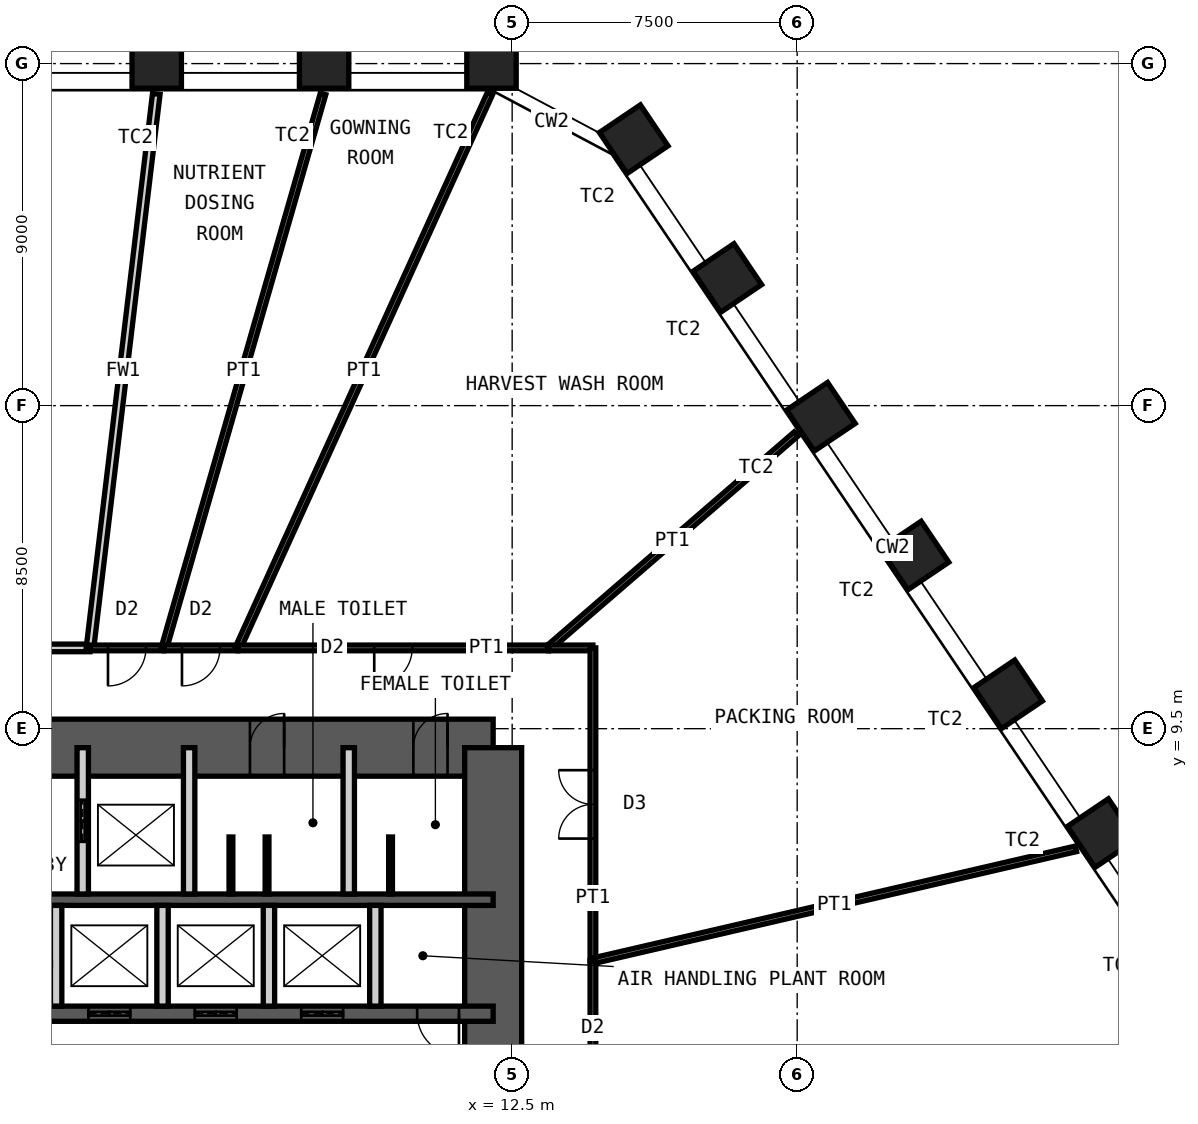
"""IFC4 building model, lengths in metres.
Left out: names, types, materials, properties, quantities, classifications, styles, units other than length and angle.
Written with IfcOpenShell. Run it as: python <this file> out.ifc"""

import sys

from ifc_helpers import new_model, si_unit, direction, frame, frame_2d, origin, origin_2d, place, context, subcontext, project, spatial, rectangle, hollow_rectangle, extrude, element, fill, save


model = new_model("IFC4")
c1 = context("Model", 3, precision=1e-05, world=origin(), true_north=direction((0.0, 1.0)))
c2 = subcontext(c1, "Body", "Model", "MODEL_VIEW")
j1 = project(units=[si_unit("LENGTHUNIT", "METRE"), si_unit("PLANEANGLEUNIT", "RADIAN")], contexts=[c1])
p1 = place(None, origin())
s1 = spatial("IfcSite", under=j1, at=p1, CompositionType="ELEMENT")
p2 = place(p1, origin())
s2 = spatial("IfcBuilding", under=s1, at=p2, CompositionType="ELEMENT")
p3 = place(p2, frame((0.0, 0.0, 77.0)))
s3 = spatial("IfcBuildingStorey", under=s2, at=p3, CompositionType="ELEMENT", Elevation=77.0)
for number, where, z_axis, x_axis in (
    (1, (3.147, 27.0, 0.0), (0.0, 0.0, 1.0), (-1.0, 0.0, 0.0)),
    (2, (7.552, 27.0, 0.0), (0.0, 0.0, 1.0), (-1.0, 0.0, 0.0)),
    (3, (11.956, 27.0, 0.0), (0.0, 0.0, 1.0), (-1.0, 0.0, 0.0)),
    (4, (15.698, 25.01, 0.0), (0.0, 0.0, 1.0), (-0.559, 0.829, 0.0)),
    (5, (18.161, 21.359, 0.0), (0.0, 0.0, 1.0), (-0.559, 0.829, 0.0)),
    (6, (20.624, 17.707, 0.0), (0.0, 0.0, 1.0), (-0.559, 0.829, 0.0)),
    (7, (23.087, 14.056, 0.0), (0.0, 0.0, 1.0), (-0.559, 0.829, 0.0)),
    (8, (25.55, 10.404, 0.0), (0.0, 0.0, 1.0), (-0.559, 0.829, 0.0)),
    (9, (28.013, 6.752, 0.0), (0.0, 0.0, 1.0), (-0.559, 0.829, 0.0)),
):
    element("IfcColumn", number, at=place(p3, frame(where, z_axis=z_axis, x_axis=x_axis)), inside=s3, PredefinedType="COLUMN", context=c2, shape_type="SweptSolid", body=[
        extrude(hollow_rectangle(XDim=1.3, YDim=1.3, WallThickness=0.1, at=origin_2d()), origin(), (0.0, 0.0, 1.0), 5.0),
    ])
p4 = place(p3, frame((-12.0, 9.0, 0.0), z_axis=(0.0, 0.0, 1.0), x_axis=(1.0, 0.0, 0.0)))
e10 = element("IfcWall", 10, at=p4, inside=s3, PredefinedType="SHEAR", context=c2, shape_type="SweptSolid", body=[
    extrude(rectangle(XDim=24.0, YDim=1.5, at=frame_2d((12.0, 0.0))), origin(), (0.0, 0.0, 1.0), 5.0),
])
p5 = place(p4, frame((10.4, 0.0, 0.0)))
e11 = element("IfcOpeningElement", 11, at=p5, cuts=e10, PredefinedType="OPENING", context=c2, shape_type="SweptSolid", body=[
    extrude(rectangle(XDim=1.0, YDim=2.1, at=frame_2d((0.5, 1.05))), frame((0.0, 0.76, 0.0), z_axis=(0.0, -1.0, 0.0), x_axis=(1.0, 0.0, 0.0)), (0.0, 0.0, 1.0), 1.52),
])
p6 = place(p4, frame((17.6, 0.0, 0.0)))
e12 = element("IfcOpeningElement", 12, at=p6, cuts=e10, PredefinedType="OPENING", context=c2, shape_type="SweptSolid", body=[
    extrude(rectangle(XDim=0.9, YDim=2.1, at=frame_2d((0.45, 1.05))), frame((0.0, 0.76, 0.0), z_axis=(0.0, -1.0, 0.0), x_axis=(1.0, 0.0, 0.0)), (0.0, 0.0, 1.0), 1.52),
])
p7 = place(p4, frame((21.9, 0.0, 0.0)))
e13 = element("IfcOpeningElement", 13, at=p7, cuts=e10, PredefinedType="OPENING", context=c2, shape_type="SweptSolid", body=[
    extrude(rectangle(XDim=0.9, YDim=2.1, at=frame_2d((0.45, 1.05))), frame((0.0, 0.76, 0.0), z_axis=(0.0, -1.0, 0.0), x_axis=(1.0, 0.0, 0.0)), (0.0, 0.0, 1.0), 1.52),
])
p8 = place(p3, frame((12.0, -9.0, 0.0), z_axis=(0.0, 0.0, 1.0), x_axis=(0.0, 1.0, 0.0)))
e14 = element("IfcWall", 14, at=p8, inside=s3, PredefinedType="SHEAR", context=c2, shape_type="SweptSolid", body=[
    extrude(rectangle(XDim=18.0, YDim=1.5, at=frame_2d((9.0, 0.0))), origin(), (0.0, 0.0, 1.0), 5.0),
])
p9 = place(p8, frame((8.1, 0.0, 0.0)))
e15 = element("IfcOpeningElement", 15, at=p9, cuts=e14, PredefinedType="OPENING", context=c2, shape_type="SweptSolid", body=[
    extrude(rectangle(XDim=1.8, YDim=2.1, at=frame_2d((0.9, 1.05))), frame((0.0, 0.76, 0.0), z_axis=(0.0, -1.0, 0.0), x_axis=(1.0, 0.0, 0.0)), (0.0, 0.0, 1.0), 1.52),
])
p10 = place(p3, frame((-12.0, 5.0, 0.0), z_axis=(0.0, 0.0, 1.0), x_axis=(1.0, 0.0, 0.0)))
e16 = element("IfcWall", 16, at=p10, inside=s3, PredefinedType="SHEAR", context=c2, shape_type="SweptSolid", body=[
    extrude(rectangle(XDim=24.0, YDim=0.3, at=frame_2d((12.0, 0.0))), origin(), (0.0, 0.0, 1.0), 5.0),
])
p11 = place(p3, frame((-12.0, 2.0, 0.0), z_axis=(0.0, 0.0, 1.0), x_axis=(1.0, 0.0, 0.0)))
e17 = element("IfcWall", 17, at=p11, inside=s3, PredefinedType="SHEAR", context=c2, shape_type="SweptSolid", body=[
    extrude(rectangle(XDim=24.0, YDim=0.4, at=frame_2d((12.0, 0.0))), origin(), (0.0, 0.0, 1.0), 5.0),
])
p12 = place(p11, frame((2.4, 0.0, 0.0)))
e18 = element("IfcOpeningElement", 18, at=p12, cuts=e17, PredefinedType="OPENING", context=c2, shape_type="SweptSolid", body=[
    extrude(rectangle(XDim=1.1, YDim=2.1, at=frame_2d((0.55, 1.05))), frame((0.0, 0.21, 0.0), z_axis=(0.0, -1.0, 0.0), x_axis=(1.0, 0.0, 0.0)), (0.0, 0.0, 1.0), 0.42),
])
p13 = place(p11, frame((22.0, 0.0, 0.0)))
e19 = element("IfcOpeningElement", 19, at=p13, cuts=e17, PredefinedType="OPENING", context=c2, shape_type="SweptSolid", body=[
    extrude(rectangle(XDim=1.1, YDim=2.1, at=frame_2d((0.55, 1.05))), frame((0.0, 0.21, 0.0), z_axis=(0.0, -1.0, 0.0), x_axis=(1.0, 0.0, 0.0)), (0.0, 0.0, 1.0), 0.42),
])
p14 = place(p11, frame((10.15, 0.0, 0.0)))
e20 = element("IfcOpeningElement", 20, at=p14, cuts=e17, PredefinedType="OPENING", context=c2, shape_type="SweptSolid", body=[
    extrude(rectangle(XDim=1.0, YDim=2.1, at=frame_2d((0.5, 1.05))), frame((0.0, 0.21, 0.0), z_axis=(0.0, -1.0, 0.0), x_axis=(1.0, 0.0, 0.0)), (0.0, 0.0, 1.0), 0.42),
])
p15 = place(p11, frame((6.7, 0.0, 0.0)))
e21 = element("IfcOpeningElement", 21, at=p15, cuts=e17, PredefinedType="OPENING", context=c2, shape_type="SweptSolid", body=[
    extrude(rectangle(XDim=1.4, YDim=2.4, at=frame_2d((0.7, 1.2))), frame((0.0, 0.21, 0.0), z_axis=(0.0, -1.0, 0.0), x_axis=(1.0, 0.0, 0.0)), (0.0, 0.0, 1.0), 0.42),
])
p16 = place(p11, frame((13.35, 0.0, 0.0)))
e22 = element("IfcOpeningElement", 22, at=p16, cuts=e17, PredefinedType="OPENING", context=c2, shape_type="SweptSolid", body=[
    extrude(rectangle(XDim=1.1, YDim=2.4, at=frame_2d((0.55, 1.2))), frame((0.0, 0.21, 0.0), z_axis=(0.0, -1.0, 0.0), x_axis=(1.0, 0.0, 0.0)), (0.0, 0.0, 1.0), 0.42),
])
p17 = place(p11, frame((16.15, 0.0, 0.0)))
e23 = element("IfcOpeningElement", 23, at=p17, cuts=e17, PredefinedType="OPENING", context=c2, shape_type="SweptSolid", body=[
    extrude(rectangle(XDim=1.1, YDim=2.4, at=frame_2d((0.55, 1.2))), frame((0.0, 0.21, 0.0), z_axis=(0.0, -1.0, 0.0), x_axis=(1.0, 0.0, 0.0)), (0.0, 0.0, 1.0), 0.42),
])
p18 = place(p11, frame((18.95, 0.0, 0.0)))
e24 = element("IfcOpeningElement", 24, at=p18, cuts=e17, PredefinedType="OPENING", context=c2, shape_type="SweptSolid", body=[
    extrude(rectangle(XDim=1.1, YDim=2.4, at=frame_2d((0.55, 1.2))), frame((0.0, 0.21, 0.0), z_axis=(0.0, -1.0, 0.0), x_axis=(1.0, 0.0, 0.0)), (0.0, 0.0, 1.0), 0.42),
])
p19 = place(p3, frame((1.2, 5.15, 0.0), z_axis=(0.0, 0.0, 1.0), x_axis=(0.0, 1.0, 0.0)))
e25 = element("IfcWall", 25, at=p19, inside=s3, PredefinedType="PARTITIONING", context=c2, shape_type="SweptSolid", body=[
    extrude(rectangle(XDim=3.85, YDim=0.3, at=frame_2d((1.925, 0.0))), origin(), (0.0, 0.0, 1.0), 4.78),
])
p20 = place(p19, frame((1.375, 0.0, 0.0)))
e26 = element("IfcOpeningElement", 26, at=p20, cuts=e25, PredefinedType="OPENING", context=c2, shape_type="SweptSolid", body=[
    extrude(rectangle(XDim=1.1, YDim=2.4, at=frame_2d((0.55, 1.2))), frame((0.0, 0.16, 0.0), z_axis=(0.0, -1.0, 0.0), x_axis=(1.0, 0.0, 0.0)), (0.0, 0.0, 1.0), 0.32),
])
for number, where, z_axis, x_axis in (
    (27, (4.0, 5.15, 0.0), (0.0, 0.0, 1.0), (0.0, 1.0, 0.0)),
    (28, (8.2, 5.15, 0.0), (0.0, 0.0, 1.0), (0.0, 1.0, 0.0)),
):
    element("IfcWall", number, at=place(p3, frame(where, z_axis=z_axis, x_axis=x_axis)), inside=s3, PredefinedType="PARTITIONING", context=c2, shape_type="SweptSolid", body=[
        extrude(rectangle(XDim=3.85, YDim=0.3, at=frame_2d((1.925, 0.0))), origin(), (0.0, 0.0, 1.0), 4.78),
    ])
for number, where, z_axis, x_axis in (
    (29, (0.5, 2.2, 0.0), (0.0, 0.0, 1.0), (0.0, 1.0, 0.0)),
    (30, (3.3, 2.2, 0.0), (0.0, 0.0, 1.0), (0.0, 1.0, 0.0)),
    (31, (6.1, 2.2, 0.0), (0.0, 0.0, 1.0), (0.0, 1.0, 0.0)),
    (32, (8.9, 2.2, 0.0), (0.0, 0.0, 1.0), (0.0, 1.0, 0.0)),
):
    element("IfcWall", number, at=place(p3, frame(where, z_axis=z_axis, x_axis=x_axis)), inside=s3, PredefinedType="PARTITIONING", context=c2, shape_type="SweptSolid", body=[
        extrude(rectangle(XDim=2.65, YDim=0.3, at=frame_2d((1.325, 0.0))), origin(), (0.0, 0.0, 1.0), 4.78),
    ])
for number, where, z_axis, x_axis in (
    (33, (5.1, 5.15, 0.0), (0.0, 0.0, 1.0), (0.0, 1.0, 0.0)),
    (34, (6.05, 5.15, 0.0), (0.0, 0.0, 1.0), (0.0, 1.0, 0.0)),
    (35, (9.3, 5.15, 0.0), (0.0, 0.0, 1.0), (0.0, 1.0, 0.0)),
):
    element("IfcWall", number, at=place(p3, frame(where, z_axis=z_axis, x_axis=x_axis)), inside=s3, PredefinedType="PARTITIONING", context=c2, shape_type="SweptSolid", body=[
        extrude(rectangle(XDim=1.5, YDim=0.1, at=frame_2d((0.75, 0.0))), origin(), (0.0, 0.0, 1.0), 2.1),
    ])
p21 = place(p3, frame((-2.503, 11.625, 0.0), z_axis=(0.0, 0.0, 1.0), x_axis=(1.0, 0.0, 0.0)))
e36 = element("IfcWall", 36, at=p21, inside=s3, PredefinedType="PARTITIONING", context=c2, shape_type="SweptSolid", body=[
    extrude(rectangle(XDim=3.894, YDim=0.2, at=frame_2d((1.947, 0.0))), origin(), (0.0, 0.0, 1.0), 4.8),
])
p22 = place(p21, frame((1.397, 0.0, 0.0)))
e37 = element("IfcOpeningElement", 37, at=p22, cuts=e36, PredefinedType="OPENING", context=c2, shape_type="SweptSolid", body=[
    extrude(rectangle(XDim=1.1, YDim=2.1, at=frame_2d((0.55, 1.05))), frame((0.0, 0.11, 0.0), z_axis=(0.0, -1.0, 0.0), x_axis=(1.0, 0.0, 0.0)), (0.0, 0.0, 1.0), 0.22),
])
p23 = place(p3, frame((3.135, 26.201, 0.0), z_axis=(0.0, 0.0, 1.0), x_axis=(-0.118796980211, -0.992918565388, 0.0)))
e38 = element("IfcWall", 38, at=p23, inside=s3, PredefinedType="PARTITIONING", context=c2, shape_type="SweptSolid", body=[
    extrude(rectangle(XDim=14.68, YDim=0.2, at=frame_2d((7.34, 0.0))), origin(), (0.0, 0.0, 1.0), 3.7),
])
p24 = place(p3, frame((1.391, 11.625, 0.0), z_axis=(0.0, 0.0, 1.0), x_axis=(1.0, 0.0, 0.0)))
e39 = element("IfcWall", 39, at=p24, inside=s3, PredefinedType="PARTITIONING", context=c2, shape_type="SweptSolid", body=[
    extrude(rectangle(XDim=1.947, YDim=0.15, at=frame_2d((0.973, 0.0))), origin(), (0.0, 0.0, 1.0), 4.8),
])
p25 = place(p24, frame((0.473, 0.0, 0.0)))
e40 = element("IfcOpeningElement", 40, at=p25, cuts=e39, PredefinedType="OPENING", context=c2, shape_type="SweptSolid", body=[
    extrude(rectangle(XDim=1.0, YDim=2.4, at=frame_2d((0.5, 1.2))), frame((0.0, 0.085, 0.0), z_axis=(0.0, -1.0, 0.0), x_axis=(1.0, 0.0, 0.0)), (0.0, 0.0, 1.0), 0.17),
])
p26 = place(p3, frame((7.524, 26.204, 0.0), z_axis=(0.0, 0.0, 1.0), x_axis=(-0.275979405656, -0.961163548858, 0.0)))
e41 = element("IfcWall", 41, at=p26, inside=s3, PredefinedType="PARTITIONING", context=c2, shape_type="SweptSolid", body=[
    extrude(rectangle(XDim=15.168, YDim=0.15, at=frame_2d((7.584, 0.0))), origin(), (0.0, 0.0, 1.0), 3.7),
])
p27 = place(p3, frame((3.338, 11.625, 0.0), z_axis=(0.0, 0.0, 1.0), x_axis=(1.0, 0.0, 0.0)))
e42 = element("IfcWall", 42, at=p27, inside=s3, PredefinedType="PARTITIONING", context=c2, shape_type="SweptSolid", body=[
    extrude(rectangle(XDim=1.947, YDim=0.15, at=frame_2d((0.974, 0.0))), origin(), (0.0, 0.0, 1.0), 4.8),
])
p28 = place(p27, frame((0.473, 0.0, 0.0)))
e43 = element("IfcOpeningElement", 43, at=p28, cuts=e42, PredefinedType="OPENING", context=c2, shape_type="SweptSolid", body=[
    extrude(rectangle(XDim=1.0, YDim=2.4, at=frame_2d((0.5, 1.2))), frame((0.0, 0.085, 0.0), z_axis=(0.0, -1.0, 0.0), x_axis=(1.0, 0.0, 0.0)), (0.0, 0.0, 1.0), 0.17),
])
p29 = place(p3, frame((11.915, 26.209, 0.0), z_axis=(0.0, 0.0, 1.0), x_axis=(-0.41384427845, -0.910347688081, 0.0)))
e44 = element("IfcWall", 44, at=p29, inside=s3, PredefinedType="PARTITIONING", context=c2, shape_type="SweptSolid", body=[
    extrude(rectangle(XDim=16.02, YDim=0.15, at=frame_2d((8.01, 0.0))), origin(), (0.0, 0.0, 1.0), 3.7),
])
p30 = place(p3, frame((5.285, 11.625, 0.0), z_axis=(0.0, 0.0, 1.0), x_axis=(1.0, 0.0, 0.0)))
e45 = element("IfcWall", 45, at=p30, inside=s3, PredefinedType="PARTITIONING", context=c2, shape_type="SweptSolid", body=[
    extrude(rectangle(XDim=8.172, YDim=0.15, at=frame_2d((4.086, 0.0))), origin(), (0.0, 0.0, 1.0), 4.8),
])
p31 = place(p30, frame((3.586, 0.0, 0.0)))
e46 = element("IfcOpeningElement", 46, at=p31, cuts=e45, PredefinedType="OPENING", context=c2, shape_type="SweptSolid", body=[
    extrude(rectangle(XDim=1.0, YDim=2.4, at=frame_2d((0.5, 1.2))), frame((0.0, 0.085, 0.0), z_axis=(0.0, -1.0, 0.0), x_axis=(1.0, 0.0, 0.0)), (0.0, 0.0, 1.0), 0.17),
])
p32 = place(p3, frame((19.968, 17.25, 0.0), z_axis=(0.0, 0.0, 1.0), x_axis=(-0.75673751601, -0.65371884772, 0.0)))
e47 = element("IfcWall", 47, at=p32, inside=s3, PredefinedType="PARTITIONING", context=c2, shape_type="SweptSolid", body=[
    extrude(rectangle(XDim=8.605, YDim=0.15, at=frame_2d((4.302, 0.0))), origin(), (0.0, 0.0, 1.0), 3.7),
])
p33 = place(p3, frame((13.457, 11.625, 0.0), z_axis=(0.0, 0.0, 1.0), x_axis=(1.0, 0.0, 0.0)))
e48 = element("IfcWall", 48, at=p33, inside=s3, PredefinedType="PARTITIONING", context=c2, shape_type="SweptSolid", body=[
    extrude(rectangle(XDim=1.168, YDim=0.15, at=frame_2d((0.584, 0.0))), origin(), (0.0, 0.0, 1.0), 4.8),
])
p34 = place(p3, frame((14.625, 11.625, 0.0), z_axis=(0.0, 0.0, 1.0), x_axis=(0.0, -1.0, 0.0)))
e49 = element("IfcWall", 49, at=p34, inside=s3, PredefinedType="PARTITIONING", context=c2, shape_type="SweptSolid", body=[
    extrude(rectangle(XDim=8.234, YDim=0.15, at=frame_2d((4.117, 0.0))), origin(), (0.0, 0.0, 1.0), 4.8),
])
p35 = place(p34, frame((3.217, 0.0, 0.0)))
e50 = element("IfcOpeningElement", 50, at=p35, cuts=e49, PredefinedType="OPENING", context=c2, shape_type="SweptSolid", body=[
    extrude(rectangle(XDim=1.8, YDim=2.4, at=frame_2d((0.9, 1.2))), frame((0.0, 0.085, 0.0), z_axis=(0.0, -1.0, 0.0), x_axis=(1.0, 0.0, 0.0)), (0.0, 0.0, 1.0), 0.17),
])
p36 = place(p3, frame((27.336, 6.338, 0.0), z_axis=(0.0, 0.0, 1.0), x_axis=(-0.974155090553, -0.225880188486, 0.0)))
e51 = element("IfcWall", 51, at=p36, inside=s3, PredefinedType="PARTITIONING", context=c2, shape_type="SweptSolid", body=[
    extrude(rectangle(XDim=13.048, YDim=0.15, at=frame_2d((6.524, 0.0))), origin(), (0.0, 0.0, 1.0), 3.7),
])
p37 = place(p3, frame((14.625, 3.391, 0.0), z_axis=(0.0, 0.0, 1.0), x_axis=(0.0, -1.0, 0.0)))
e52 = element("IfcWall", 52, at=p37, inside=s3, PredefinedType="PARTITIONING", context=c2, shape_type="SweptSolid", body=[
    extrude(rectangle(XDim=5.722, YDim=0.15, at=frame_2d((2.861, 0.0))), origin(), (0.0, 0.0, 1.0), 4.8),
])
p38 = place(p37, frame((2.361, 0.0, 0.0)))
e53 = element("IfcOpeningElement", 53, at=p38, cuts=e52, PredefinedType="OPENING", context=c2, shape_type="SweptSolid", body=[
    extrude(rectangle(XDim=1.0, YDim=2.4, at=frame_2d((0.5, 1.2))), frame((0.0, 0.085, 0.0), z_axis=(0.0, -1.0, 0.0), x_axis=(1.0, 0.0, 0.0)), (0.0, 0.0, 1.0), 0.17),
])
p39 = place(p6, origin())
e54 = element("IfcDoor", 54, at=p39, inside=s3, OperationType="SINGLE_SWING_LEFT", PredefinedType="DOOR", context=c2, shape_type="SweptSolid", body=[
    extrude(rectangle(XDim=0.9, YDim=2.1, at=frame_2d((0.45, 1.05))), frame((0.0, 0.025, 0.0), z_axis=(0.0, -1.0, 0.0), x_axis=(1.0, 0.0, 0.0)), (0.0, 0.0, 1.0), 0.05),
])
fill(e12, e54)
p40 = place(p7, origin())
e55 = element("IfcDoor", 55, at=p40, inside=s3, OperationType="SINGLE_SWING_LEFT", PredefinedType="DOOR", context=c2, shape_type="SweptSolid", body=[
    extrude(rectangle(XDim=0.9, YDim=2.1, at=frame_2d((0.45, 1.05))), frame((0.0, 0.025, 0.0), z_axis=(0.0, -1.0, 0.0), x_axis=(1.0, 0.0, 0.0)), (0.0, 0.0, 1.0), 0.05),
])
fill(e13, e55)
p41 = place(p13, origin())
e56 = element("IfcDoor", 56, at=p41, inside=s3, OperationType="SINGLE_SWING_RIGHT", PredefinedType="DOOR", context=c2, shape_type="SweptSolid", body=[
    extrude(rectangle(XDim=1.1, YDim=2.1, at=frame_2d((0.55, 1.05))), frame((0.0, 0.025, 0.0), z_axis=(0.0, -1.0, 0.0), x_axis=(1.0, 0.0, 0.0)), (0.0, 0.0, 1.0), 0.05),
])
fill(e19, e56)
p42 = place(p20, origin())
e57 = element("IfcDoor", 57, at=p42, inside=s3, OperationType="DOUBLE_DOOR_SLIDING", PredefinedType="DOOR", context=c2, shape_type="SweptSolid", body=[
    extrude(rectangle(XDim=1.1, YDim=2.4, at=frame_2d((0.55, 1.2))), frame((0.0, 0.025, 0.0), z_axis=(0.0, -1.0, 0.0), x_axis=(1.0, 0.0, 0.0)), (0.0, 0.0, 1.0), 0.05),
])
fill(e26, e57)
p43 = place(p16, origin())
e58 = element("IfcDoor", 58, at=p43, inside=s3, OperationType="DOUBLE_DOOR_SLIDING", PredefinedType="DOOR", context=c2, shape_type="SweptSolid", body=[
    extrude(rectangle(XDim=1.1, YDim=2.4, at=frame_2d((0.55, 1.2))), frame((0.0, 0.025, 0.0), z_axis=(0.0, -1.0, 0.0), x_axis=(1.0, 0.0, 0.0)), (0.0, 0.0, 1.0), 0.05),
])
fill(e22, e58)
p44 = place(p17, origin())
e59 = element("IfcDoor", 59, at=p44, inside=s3, OperationType="DOUBLE_DOOR_SLIDING", PredefinedType="DOOR", context=c2, shape_type="SweptSolid", body=[
    extrude(rectangle(XDim=1.1, YDim=2.4, at=frame_2d((0.55, 1.2))), frame((0.0, 0.025, 0.0), z_axis=(0.0, -1.0, 0.0), x_axis=(1.0, 0.0, 0.0)), (0.0, 0.0, 1.0), 0.05),
])
fill(e23, e59)
p45 = place(p18, origin())
e60 = element("IfcDoor", 60, at=p45, inside=s3, OperationType="DOUBLE_DOOR_SLIDING", PredefinedType="DOOR", context=c2, shape_type="SweptSolid", body=[
    extrude(rectangle(XDim=1.1, YDim=2.4, at=frame_2d((0.55, 1.2))), frame((0.0, 0.025, 0.0), z_axis=(0.0, -1.0, 0.0), x_axis=(1.0, 0.0, 0.0)), (0.0, 0.0, 1.0), 0.05),
])
fill(e24, e60)
p46 = place(p25, origin())
e61 = element("IfcDoor", 61, at=p46, inside=s3, OperationType="SINGLE_SWING_LEFT", PredefinedType="DOOR", context=c2, shape_type="SweptSolid", body=[
    extrude(rectangle(XDim=1.0, YDim=2.4, at=frame_2d((0.5, 1.2))), frame((0.0, 0.025, 0.0), z_axis=(0.0, -1.0, 0.0), x_axis=(1.0, 0.0, 0.0)), (0.0, 0.0, 1.0), 0.05),
])
fill(e40, e61)
p47 = place(p28, origin())
e62 = element("IfcDoor", 62, at=p47, inside=s3, OperationType="SINGLE_SWING_LEFT", PredefinedType="DOOR", context=c2, shape_type="SweptSolid", body=[
    extrude(rectangle(XDim=1.0, YDim=2.4, at=frame_2d((0.5, 1.2))), frame((0.0, 0.025, 0.0), z_axis=(0.0, -1.0, 0.0), x_axis=(1.0, 0.0, 0.0)), (0.0, 0.0, 1.0), 0.05),
])
fill(e43, e62)
p48 = place(p31, origin())
e63 = element("IfcDoor", 63, at=p48, inside=s3, OperationType="SINGLE_SWING_LEFT", PredefinedType="DOOR", context=c2, shape_type="SweptSolid", body=[
    extrude(rectangle(XDim=1.0, YDim=2.4, at=frame_2d((0.5, 1.2))), frame((0.0, 0.025, 0.0), z_axis=(0.0, -1.0, 0.0), x_axis=(1.0, 0.0, 0.0)), (0.0, 0.0, 1.0), 0.05),
])
fill(e46, e63)
p49 = place(p35, origin())
e64 = element("IfcDoor", 64, at=p49, inside=s3, OperationType="DOUBLE_DOOR_DOUBLE_SWING", PredefinedType="DOOR", context=c2, shape_type="SweptSolid", body=[
    extrude(rectangle(XDim=1.8, YDim=2.4, at=frame_2d((0.9, 1.2))), frame((0.0, 0.025, 0.0), z_axis=(0.0, -1.0, 0.0), x_axis=(1.0, 0.0, 0.0)), (0.0, 0.0, 1.0), 0.05),
])
fill(e50, e64)
save(model, sys.argv[1])
